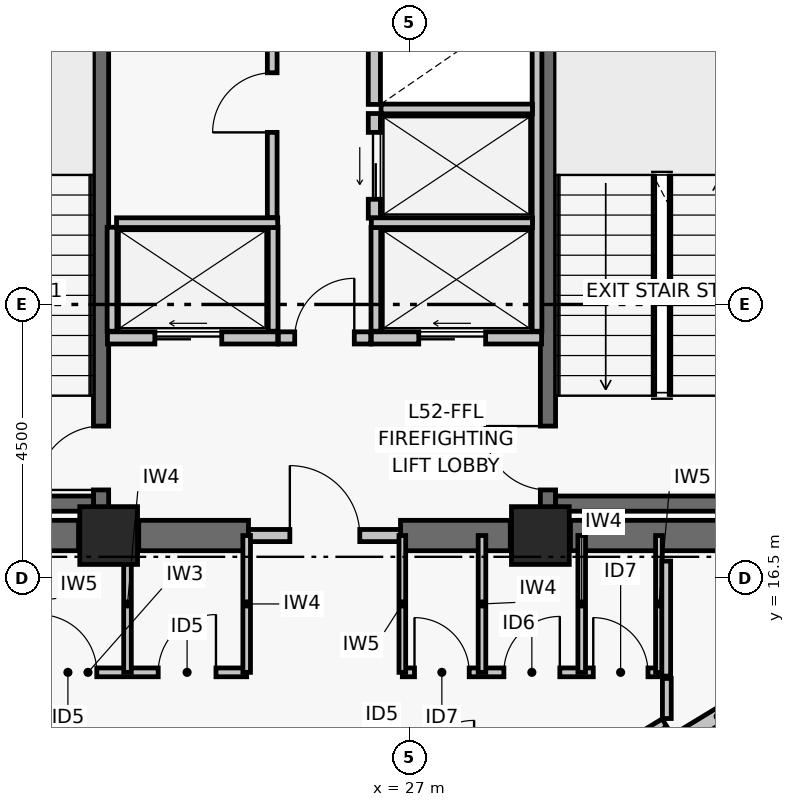
"""IFC4 building model, lengths in metres.
Left out: names, types, materials, properties, quantities, classifications, styles, units other than length and angle.
Written with IfcOpenShell. Run it as: python <this file> out.ifc"""

import sys

from ifc_helpers import new_model, si_unit, direction, frame, frame_2d, origin, origin_2d, place, context, subcontext, project, spatial, rectangle, extrude, element, fill, save


model = new_model("IFC4")
c1 = context("Model", 3, precision=1e-05, world=origin(), true_north=direction((0.0, 1.0)))
c2 = subcontext(c1, "Body", "Model", "MODEL_VIEW")
j1 = project(units=[si_unit("LENGTHUNIT", "METRE"), si_unit("PLANEANGLEUNIT", "RADIAN")], contexts=[c1])
p1 = place(None, origin())
s1 = spatial("IfcSite", under=j1, at=p1, CompositionType="ELEMENT")
p2 = place(p1, origin())
s2 = spatial("IfcBuilding", under=s1, at=p2, CompositionType="ELEMENT")
p3 = place(p2, frame((0.0, 0.0, 206.4)))
s3 = spatial("IfcBuildingStorey", under=s2, at=p3, CompositionType="ELEMENT", Elevation=206.4)
for number, where, z_axis, x_axis in (
    (1, (22.05, 17.2, 0.0), (0.0, 0.0, 1.0), (1.0, 0.0, 0.0)),
    (2, (29.15, 17.2, 0.0), (0.0, 0.0, 1.0), (1.0, 0.0, 0.0)),
):
    element("IfcColumn", number, at=place(p3, frame(where, z_axis=z_axis, x_axis=x_axis)), inside=s3, PredefinedType="COLUMN", context=c2, shape_type="SweptSolid", body=[
        extrude(rectangle(XDim=0.95, YDim=0.95, at=origin_2d()), origin(), (0.0, 0.0, 1.0), 3.72),
    ])
p4 = place(p3, frame((18.295, 17.2, 0.0), z_axis=(0.0, 0.0, 1.0), x_axis=(1.0, 0.0, 0.0)))
e3 = element("IfcWall", 3, at=p4, inside=s3, PredefinedType="SHEAR", context=c2, shape_type="SweptSolid", body=[
    extrude(rectangle(XDim=3.26, YDim=0.5, at=frame_2d((1.63, 0.0))), origin(), (0.0, 0.0, 1.0), 3.5),
])
p5 = place(p3, frame((22.545, 17.2, 0.0), z_axis=(0.0, 0.0, 1.0), x_axis=(1.0, 0.0, 0.0)))
e4 = element("IfcWall", 4, at=p5, inside=s3, PredefinedType="SHEAR", context=c2, shape_type="SweptSolid", body=[
    extrude(rectangle(XDim=1.805, YDim=0.5, at=frame_2d((0.903, 0.0))), origin(), (0.0, 0.0, 1.0), 3.5),
])
p6 = place(p3, frame((26.85, 17.2, 0.0), z_axis=(0.0, 0.0, 1.0), x_axis=(1.0, 0.0, 0.0)))
e5 = element("IfcWall", 5, at=p6, inside=s3, PredefinedType="SHEAR", context=c2, shape_type="SweptSolid", body=[
    extrude(rectangle(XDim=1.805, YDim=0.5, at=frame_2d((0.902, 0.0))), origin(), (0.0, 0.0, 1.0), 3.5),
])
p7 = place(p3, frame((29.645, 17.2, 0.0), z_axis=(0.0, 0.0, 1.0), x_axis=(1.0, 0.0, 0.0)))
e6 = element("IfcWall", 6, at=p7, inside=s3, PredefinedType="SHEAR", context=c2, shape_type="SweptSolid", body=[
    extrude(rectangle(XDim=3.26, YDim=0.5, at=frame_2d((1.63, 0.0))), origin(), (0.0, 0.0, 1.0), 3.5),
])
p8 = place(p3, frame((21.925, 17.6, 0.0), z_axis=(0.0, 0.0, 1.0), x_axis=(0.0, 1.0, 0.0)))
e7 = element("IfcWall", 7, at=p8, inside=s3, PredefinedType="SHEAR", context=c2, shape_type="SweptSolid", body=[
    extrude(rectangle(XDim=8.8, YDim=0.25, at=frame_2d((4.4, 0.0))), origin(), (0.0, 0.0, 1.0), 3.5),
])
p9 = place(p8, frame((0.35, 0.0, 0.0)))
e8 = element("IfcOpeningElement", 8, at=p9, cuts=e7, PredefinedType="OPENING", context=c2, shape_type="SweptSolid", body=[
    extrude(rectangle(XDim=1.05, YDim=2.08, at=frame_2d((0.525, 1.04))), frame((0.0, 0.135, 0.0), z_axis=(0.0, -1.0, 0.0), x_axis=(1.0, 0.0, 0.0)), (0.0, 0.0, 1.0), 0.27),
])
p10 = place(p3, frame((18.304, 17.725, 0.0), z_axis=(0.0, 0.0, 1.0), x_axis=(1.0, 0.0, 0.0)))
e9 = element("IfcWall", 9, at=p10, inside=s3, PredefinedType="SHEAR", context=c2, shape_type="SweptSolid", body=[
    extrude(rectangle(XDim=3.496, YDim=0.25, at=frame_2d((1.748, 0.0))), origin(), (0.0, 0.0, 1.0), 3.5),
])
p11 = place(p3, frame((29.275, 17.6, 0.0), z_axis=(0.0, 0.0, 1.0), x_axis=(0.0, 1.0, 0.0)))
e10 = element("IfcWall", 10, at=p11, inside=s3, PredefinedType="SHEAR", context=c2, shape_type="SweptSolid", body=[
    extrude(rectangle(XDim=8.8, YDim=0.25, at=frame_2d((4.4, 0.0))), origin(), (0.0, 0.0, 1.0), 3.5),
])
p12 = place(p11, frame((0.35, 0.0, 0.0)))
e11 = element("IfcOpeningElement", 11, at=p12, cuts=e10, PredefinedType="OPENING", context=c2, shape_type="SweptSolid", body=[
    extrude(rectangle(XDim=1.05, YDim=2.08, at=frame_2d((0.525, 1.04))), frame((0.0, 0.135, 0.0), z_axis=(0.0, -1.0, 0.0), x_axis=(1.0, 0.0, 0.0)), (0.0, 0.0, 1.0), 0.27),
])
p13 = place(p3, frame((29.4, 17.725, 0.0), z_axis=(0.0, 0.0, 1.0), x_axis=(1.0, 0.0, 0.0)))
e12 = element("IfcWall", 12, at=p13, inside=s3, PredefinedType="SHEAR", context=c2, shape_type="SweptSolid", body=[
    extrude(rectangle(XDim=3.496, YDim=0.25, at=frame_2d((1.748, 0.0))), origin(), (0.0, 0.0, 1.0), 3.5),
])
p14 = place(p3, frame((34.761, 15.858, 0.0), z_axis=(0.0, 0.0, 1.0), x_axis=(-0.854645314226, -0.519212275348, 0.0)))
e13 = element("IfcWall", 13, at=p14, inside=s3, PredefinedType="PARTITIONING", context=c2, shape_type="SweptSolid", body=[
    extrude(rectangle(XDim=6.285, YDim=0.26, at=frame_2d((3.143, 0.0))), origin(), (0.0, 0.0, 1.0), 3.5),
])
p15 = place(p3, frame((24.35, 17.2, 0.0), z_axis=(0.0, 0.0, 1.0), x_axis=(1.0, 0.0, 0.0)))
e14 = element("IfcWall", 14, at=p15, inside=s3, PredefinedType="PARTITIONING", context=c2, shape_type="SweptSolid", body=[
    extrude(rectangle(XDim=2.5, YDim=0.2, at=frame_2d((1.25, 0.0))), origin(), (0.0, 0.0, 1.0), 2.63),
])
p16 = place(p15, frame((0.68, 0.0, 0.0)))
e15 = element("IfcOpeningElement", 15, at=p16, cuts=e14, PredefinedType="OPENING", context=c2, shape_type="SweptSolid", body=[
    extrude(rectangle(XDim=1.15, YDim=2.08, at=frame_2d((0.575, 1.04))), frame((0.0, 0.11, 0.0), z_axis=(0.0, -1.0, 0.0), x_axis=(1.0, 0.0, 0.0)), (0.0, 0.0, 1.0), 0.22),
])
p17 = place(p3, frame((24.84, 20.45, 0.0), z_axis=(0.0, 0.0, 1.0), x_axis=(1.0, 0.0, 0.0)))
e16 = element("IfcWall", 16, at=p17, inside=s3, PredefinedType="PARTITIONING", context=c2, shape_type="SweptSolid", body=[
    extrude(rectangle(XDim=1.52, YDim=0.2, at=frame_2d((0.76, 0.0))), origin(), (0.0, 0.0, 1.0), 3.5),
])
p18 = place(p17, frame((0.27, 0.0, 0.0)))
e17 = element("IfcOpeningElement", 17, at=p18, cuts=e16, PredefinedType="OPENING", context=c2, shape_type="SweptSolid", body=[
    extrude(rectangle(XDim=0.98, YDim=2.06, at=frame_2d((0.49, 1.03))), frame((0.0, 0.11, 0.0), z_axis=(0.0, -1.0, 0.0), x_axis=(1.0, 0.0, 0.0)), (0.0, 0.0, 1.0), 0.22),
])
p19 = place(p3, frame((22.03, 20.45, 0.0), z_axis=(0.0, 0.0, 1.0), x_axis=(1.0, 0.0, 0.0)))
e18 = element("IfcWall", 18, at=p19, inside=s3, PredefinedType="PARTITIONING", context=c2, shape_type="SweptSolid", body=[
    extrude(rectangle(XDim=2.8, YDim=0.2, at=frame_2d((1.4, 0.0))), origin(), (0.0, 0.0, 1.0), 3.5),
])
p20 = place(p19, frame((0.78, 0.0, 0.0)))
e19 = element("IfcOpeningElement", 19, at=p20, cuts=e18, PredefinedType="OPENING", context=c2, shape_type="SweptSolid", body=[
    extrude(rectangle(XDim=1.1, YDim=2.08, at=frame_2d((0.55, 1.04))), frame((0.0, 0.11, 0.0), z_axis=(0.0, -1.0, 0.0), x_axis=(1.0, 0.0, 0.0)), (0.0, 0.0, 1.0), 0.22),
])
p21 = place(p3, frame((26.37, 20.45, 0.0), z_axis=(0.0, 0.0, 1.0), x_axis=(1.0, 0.0, 0.0)))
e20 = element("IfcWall", 20, at=p21, inside=s3, PredefinedType="PARTITIONING", context=c2, shape_type="SweptSolid", body=[
    extrude(rectangle(XDim=2.8, YDim=0.2, at=frame_2d((1.4, 0.0))), origin(), (0.0, 0.0, 1.0), 3.5),
])
p22 = place(p21, frame((0.78, 0.0, 0.0)))
e21 = element("IfcOpeningElement", 21, at=p22, cuts=e20, PredefinedType="OPENING", context=c2, shape_type="SweptSolid", body=[
    extrude(rectangle(XDim=1.1, YDim=2.08, at=frame_2d((0.55, 1.04))), frame((0.0, 0.11, 0.0), z_axis=(0.0, -1.0, 0.0), x_axis=(1.0, 0.0, 0.0)), (0.0, 0.0, 1.0), 0.22),
])
p23 = place(p3, frame((26.42, 22.42, 0.0), z_axis=(0.0, 0.0, 1.0), x_axis=(0.0, 1.0, 0.0)))
e22 = element("IfcWall", 22, at=p23, inside=s3, PredefinedType="PARTITIONING", context=c2, shape_type="SweptSolid", body=[
    extrude(rectangle(XDim=1.72, YDim=0.2, at=frame_2d((0.86, 0.0))), origin(), (0.0, 0.0, 1.0), 3.5),
])
p24 = place(p23, frame((0.31, 0.0, 0.0)))
e23 = element("IfcOpeningElement", 23, at=p24, cuts=e22, PredefinedType="OPENING", context=c2, shape_type="SweptSolid", body=[
    extrude(rectangle(XDim=1.1, YDim=2.08, at=frame_2d((0.55, 1.04))), frame((0.0, 0.11, 0.0), z_axis=(0.0, -1.0, 0.0), x_axis=(1.0, 0.0, 0.0)), (0.0, 0.0, 1.0), 0.22),
])
p25 = place(p3, frame((26.42, 24.29, 0.0), z_axis=(0.0, 0.0, 1.0), x_axis=(0.0, 1.0, 0.0)))
e24 = element("IfcWall", 24, at=p25, inside=s3, PredefinedType="PARTITIONING", context=c2, shape_type="SweptSolid", body=[
    extrude(rectangle(XDim=1.72, YDim=0.2, at=frame_2d((0.86, 0.0))), origin(), (0.0, 0.0, 1.0), 3.5),
])
for number, where, z_axis, x_axis in (
    (25, (22.105, 20.56, 0.0), (0.0, 0.0, 1.0), (0.0, 1.0, 0.0)),
    (26, (24.755, 20.56, 0.0), (0.0, 0.0, 1.0), (0.0, 1.0, 0.0)),
):
    element("IfcWall", number, at=place(p3, frame(where, z_axis=z_axis, x_axis=x_axis)), inside=s3, PredefinedType="PARTITIONING", context=c2, shape_type="SweptSolid", body=[
        extrude(rectangle(XDim=1.71, YDim=0.16, at=frame_2d((0.855, 0.0))), origin(), (0.0, 0.0, 1.0), 3.5),
    ])
p26 = place(p3, frame((22.18, 22.345, 0.0), z_axis=(0.0, 0.0, 1.0), x_axis=(1.0, 0.0, 0.0)))
e27 = element("IfcWall", 27, at=p26, inside=s3, PredefinedType="PARTITIONING", context=c2, shape_type="SweptSolid", body=[
    extrude(rectangle(XDim=2.65, YDim=0.16, at=frame_2d((1.325, 0.0))), origin(), (0.0, 0.0, 1.0), 3.5),
])
p27 = place(p3, frame((29.095, 20.56, 0.0), z_axis=(0.0, 0.0, 1.0), x_axis=(0.0, 1.0, 0.0)))
e28 = element("IfcWall", 28, at=p27, inside=s3, PredefinedType="PARTITIONING", context=c2, shape_type="SweptSolid", body=[
    extrude(rectangle(XDim=5.45, YDim=0.16, at=frame_2d((2.725, 0.0))), origin(), (0.0, 0.0, 1.0), 3.5),
])
p28 = place(p3, frame((26.445, 20.56, 0.0), z_axis=(0.0, 0.0, 1.0), x_axis=(0.0, 1.0, 0.0)))
e29 = element("IfcWall", 29, at=p28, inside=s3, PredefinedType="PARTITIONING", context=c2, shape_type="SweptSolid", body=[
    extrude(rectangle(XDim=1.71, YDim=0.16, at=frame_2d((0.855, 0.0))), origin(), (0.0, 0.0, 1.0), 3.5),
])
p29 = place(p3, frame((26.37, 22.345, 0.0), z_axis=(0.0, 0.0, 1.0), x_axis=(1.0, 0.0, 0.0)))
e30 = element("IfcWall", 30, at=p29, inside=s3, PredefinedType="PARTITIONING", context=c2, shape_type="SweptSolid", body=[
    extrude(rectangle(XDim=2.65, YDim=0.16, at=frame_2d((1.325, 0.0))), origin(), (0.0, 0.0, 1.0), 3.5),
])
p30 = place(p3, frame((26.53, 24.215, 0.0), z_axis=(0.0, 0.0, 1.0), x_axis=(1.0, 0.0, 0.0)))
e31 = element("IfcWall", 31, at=p30, inside=s3, PredefinedType="PARTITIONING", context=c2, shape_type="SweptSolid", body=[
    extrude(rectangle(XDim=2.49, YDim=0.16, at=frame_2d((1.245, 0.0))), origin(), (0.0, 0.0, 1.0), 3.5),
])
p31 = place(p3, frame((24.74, 22.43, 0.0), z_axis=(0.0, 0.0, 1.0), x_axis=(0.0, 1.0, 0.0)))
e32 = element("IfcWall", 32, at=p31, inside=s3, PredefinedType="PARTITIONING", context=c2, shape_type="SweptSolid", body=[
    extrude(rectangle(XDim=4.37, YDim=0.16, at=frame_2d((2.185, 0.0))), origin(), (0.0, 0.0, 1.0), 2.21),
])
p32 = place(p31, frame((1.4, 0.0, 0.0)))
e33 = element("IfcOpeningElement", 33, at=p32, cuts=e32, PredefinedType="OPENING", context=c2, shape_type="SweptSolid", body=[
    extrude(rectangle(XDim=0.98, YDim=2.06, at=frame_2d((0.49, 1.03))), frame((0.0, 0.09, 0.0), z_axis=(0.0, -1.0, 0.0), x_axis=(1.0, 0.0, 0.0)), (0.0, 0.0, 1.0), 0.18),
])
p33 = place(p3, frame((19.1, 14.95, 0.0), z_axis=(0.0, 0.0, 1.0), x_axis=(1.0, 0.0, 0.0)))
e34 = element("IfcWall", 34, at=p33, inside=s3, PredefinedType="PARTITIONING", context=c2, shape_type="SweptSolid", body=[
    extrude(rectangle(XDim=5.22, YDim=0.145, at=frame_2d((2.61, 0.0))), origin(), (0.0, 0.0, 1.0), 2.73),
])
p34 = place(p33, frame((0.2, 0.0, 0.0)))
e35 = element("IfcOpeningElement", 35, at=p34, cuts=e34, PredefinedType="OPENING", context=c2, shape_type="SweptSolid", body=[
    extrude(rectangle(XDim=0.9, YDim=2.02, at=frame_2d((0.45, 1.01))), frame((0.0, 0.083, 0.0), z_axis=(0.0, -1.0, 0.0), x_axis=(1.0, 0.0, 0.0)), (0.0, 0.0, 1.0), 0.165),
])
p35 = place(p33, frame((1.805, 0.0, 0.0)))
e36 = element("IfcOpeningElement", 36, at=p35, cuts=e34, PredefinedType="OPENING", context=c2, shape_type="SweptSolid", body=[
    extrude(rectangle(XDim=0.95, YDim=2.06, at=frame_2d((0.475, 1.03))), frame((0.0, 0.083, 0.0), z_axis=(0.0, -1.0, 0.0), x_axis=(1.0, 0.0, 0.0)), (0.0, 0.0, 1.0), 0.165),
])
p36 = place(p33, frame((3.765, 0.0, 0.0)))
e37 = element("IfcOpeningElement", 37, at=p36, cuts=e34, PredefinedType="OPENING", context=c2, shape_type="SweptSolid", body=[
    extrude(rectangle(XDim=0.95, YDim=2.06, at=frame_2d((0.475, 1.03))), frame((0.0, 0.083, 0.0), z_axis=(0.0, -1.0, 0.0), x_axis=(1.0, 0.0, 0.0)), (0.0, 0.0, 1.0), 0.165),
])
p37 = place(p3, frame((26.88, 14.95, 0.0), z_axis=(0.0, 0.0, 1.0), x_axis=(1.0, 0.0, 0.0)))
e38 = element("IfcWall", 38, at=p37, inside=s3, PredefinedType="PARTITIONING", context=c2, shape_type="SweptSolid", body=[
    extrude(rectangle(XDim=4.22, YDim=0.145, at=frame_2d((2.11, 0.0))), origin(), (0.0, 0.0, 1.0), 2.93),
])
p38 = place(p37, frame((0.2, 0.0, 0.0)))
e39 = element("IfcOpeningElement", 39, at=p38, cuts=e38, PredefinedType="OPENING", context=c2, shape_type="SweptSolid", body=[
    extrude(rectangle(XDim=0.9, YDim=2.02, at=frame_2d((0.45, 1.01))), frame((0.0, 0.083, 0.0), z_axis=(0.0, -1.0, 0.0), x_axis=(1.0, 0.0, 0.0)), (0.0, 0.0, 1.0), 0.165),
])
p39 = place(p37, frame((1.67, 0.0, 0.0)))
e40 = element("IfcOpeningElement", 40, at=p39, cuts=e38, PredefinedType="OPENING", context=c2, shape_type="SweptSolid", body=[
    extrude(rectangle(XDim=0.92, YDim=2.05, at=frame_2d((0.46, 1.025))), frame((0.0, 0.083, 0.0), z_axis=(0.0, -1.0, 0.0), x_axis=(1.0, 0.0, 0.0)), (0.0, 0.0, 1.0), 0.165),
])
p40 = place(p37, frame((3.14, 0.0, 0.0)))
e41 = element("IfcOpeningElement", 41, at=p40, cuts=e38, PredefinedType="OPENING", context=c2, shape_type="SweptSolid", body=[
    extrude(rectangle(XDim=0.9, YDim=2.02, at=frame_2d((0.45, 1.01))), frame((0.0, 0.083, 0.0), z_axis=(0.0, -1.0, 0.0), x_axis=(1.0, 0.0, 0.0)), (0.0, 0.0, 1.0), 0.165),
])
for number, where, z_axis, x_axis in (
    (42, (22.36, 14.95, 0.0), (0.0, 0.0, 1.0), (0.0, 1.0, 0.0)),
    (43, (24.32, 14.95, 0.0), (0.0, 0.0, 1.0), (0.0, 1.0, 0.0)),
):
    element("IfcWall", number, at=place(p3, frame(where, z_axis=z_axis, x_axis=x_axis)), inside=s3, PredefinedType="PARTITIONING", context=c2, shape_type="SweptSolid", body=[
        extrude(rectangle(XDim=2.25, YDim=0.125, at=frame_2d((1.125, 0.0))), origin(), (0.0, 0.0, 1.0), 2.63),
    ])
p41 = place(p3, frame((26.88, 14.95, 0.0), z_axis=(0.0, 0.0, 1.0), x_axis=(0.0, 1.0, 0.0)))
e44 = element("IfcWall", 44, at=p41, inside=s3, PredefinedType="PARTITIONING", context=c2, shape_type="SweptSolid", body=[
    extrude(rectangle(XDim=2.25, YDim=0.11, at=frame_2d((1.125, 0.0))), origin(), (0.0, 0.0, 1.0), 2.63),
])
for number, where, z_axis, x_axis in (
    (45, (28.19, 14.95, 0.0), (0.0, 0.0, 1.0), (0.0, 1.0, 0.0)),
    (46, (29.83, 14.95, 0.0), (0.0, 0.0, 1.0), (0.0, 1.0, 0.0)),
):
    element("IfcWall", number, at=place(p3, frame(where, z_axis=z_axis, x_axis=x_axis)), inside=s3, PredefinedType="PARTITIONING", context=c2, shape_type="SweptSolid", body=[
        extrude(rectangle(XDim=2.25, YDim=0.125, at=frame_2d((1.125, 0.0))), origin(), (0.0, 0.0, 1.0), 2.63),
    ])
p42 = place(p3, frame((31.1, 14.95, 0.0), z_axis=(0.0, 0.0, 1.0), x_axis=(0.0, 1.0, 0.0)))
e47 = element("IfcWall", 47, at=p42, inside=s3, PredefinedType="PARTITIONING", context=c2, shape_type="SweptSolid", body=[
    extrude(rectangle(XDim=2.25, YDim=0.11, at=frame_2d((1.125, 0.0))), origin(), (0.0, 0.0, 1.0), 2.63),
])
p43 = place(p3, frame((29.709, 13.222, 0.0), z_axis=(0.0, 0.0, 1.0), x_axis=(0.854635840942, 0.519227868451, 0.0)))
e48 = element("IfcWall", 48, at=p43, inside=s3, PredefinedType="PARTITIONING", context=c2, shape_type="SweptSolid", body=[
    extrude(rectangle(XDim=1.735, YDim=0.145, at=frame_2d((0.867, 0.0))), origin(), (0.0, 0.0, 1.0), 3.5),
])
p44 = place(p3, frame((31.23, 14.191, 0.0), z_axis=(0.0, 0.0, 1.0), x_axis=(0.0, 1.0, 0.0)))
e49 = element("IfcWall", 49, at=p44, inside=s3, PredefinedType="PARTITIONING", context=c2, shape_type="SweptSolid", body=[
    extrude(rectangle(XDim=0.659, YDim=0.145, at=frame_2d((0.33, 0.0))), origin(), (0.0, 0.0, 1.0), 3.5),
])
p45 = place(p3, frame((31.22, 14.889, 0.0), z_axis=(0.0, 0.0, 1.0), x_axis=(0.0, 1.0, 0.0)))
e50 = element("IfcWall", 50, at=p45, inside=s3, PredefinedType="PARTITIONING", context=c2, shape_type="SweptSolid", body=[
    extrude(rectangle(XDim=1.891, YDim=0.145, at=frame_2d((0.946, 0.0))), origin(), (0.0, 0.0, 1.0), 2.63),
])
p46 = place(p9, origin())
e51 = element("IfcDoor", 51, at=p46, inside=s3, OperationType="SINGLE_SWING_LEFT", PredefinedType="DOOR", context=c2, shape_type="SweptSolid", body=[
    extrude(rectangle(XDim=1.05, YDim=2.08, at=frame_2d((0.525, 1.04))), frame((0.0, 0.025, 0.0), z_axis=(0.0, -1.0, 0.0), x_axis=(1.0, 0.0, 0.0)), (0.0, 0.0, 1.0), 0.05),
])
fill(e8, e51)
p47 = place(p12, origin())
e52 = element("IfcDoor", 52, at=p47, inside=s3, OperationType="SINGLE_SWING_RIGHT", PredefinedType="DOOR", context=c2, shape_type="SweptSolid", body=[
    extrude(rectangle(XDim=1.05, YDim=2.08, at=frame_2d((0.525, 1.04))), frame((0.0, 0.025, 0.0), z_axis=(0.0, -1.0, 0.0), x_axis=(1.0, 0.0, 0.0)), (0.0, 0.0, 1.0), 0.05),
])
fill(e11, e52)
p48 = place(p16, origin())
e53 = element("IfcDoor", 53, at=p48, inside=s3, OperationType="SINGLE_SWING_LEFT", PredefinedType="DOOR", context=c2, shape_type="SweptSolid", body=[
    extrude(rectangle(XDim=1.15, YDim=2.08, at=frame_2d((0.575, 1.04))), frame((0.0, 0.025, 0.0), z_axis=(0.0, -1.0, 0.0), x_axis=(1.0, 0.0, 0.0)), (0.0, 0.0, 1.0), 0.05),
])
fill(e15, e53)
p49 = place(p18, origin())
e54 = element("IfcDoor", 54, at=p49, inside=s3, OperationType="SINGLE_SWING_RIGHT", PredefinedType="DOOR", context=c2, shape_type="SweptSolid", body=[
    extrude(rectangle(XDim=0.98, YDim=2.06, at=frame_2d((0.49, 1.03))), frame((0.0, 0.025, 0.0), z_axis=(0.0, -1.0, 0.0), x_axis=(1.0, 0.0, 0.0)), (0.0, 0.0, 1.0), 0.05),
])
fill(e17, e54)
p50 = place(p20, origin())
e55 = element("IfcDoor", 55, at=p50, inside=s3, OperationType="DOUBLE_DOOR_SLIDING", PredefinedType="DOOR", context=c2, shape_type="SweptSolid", body=[
    extrude(rectangle(XDim=1.1, YDim=2.08, at=frame_2d((0.55, 1.04))), frame((0.0, 0.025, 0.0), z_axis=(0.0, -1.0, 0.0), x_axis=(1.0, 0.0, 0.0)), (0.0, 0.0, 1.0), 0.05),
])
fill(e19, e55)
p51 = place(p22, origin())
e56 = element("IfcDoor", 56, at=p51, inside=s3, OperationType="DOUBLE_DOOR_SLIDING", PredefinedType="DOOR", context=c2, shape_type="SweptSolid", body=[
    extrude(rectangle(XDim=1.1, YDim=2.08, at=frame_2d((0.55, 1.04))), frame((0.0, 0.025, 0.0), z_axis=(0.0, -1.0, 0.0), x_axis=(1.0, 0.0, 0.0)), (0.0, 0.0, 1.0), 0.05),
])
fill(e21, e56)
p52 = place(p24, origin())
e57 = element("IfcDoor", 57, at=p52, inside=s3, OperationType="DOUBLE_DOOR_SLIDING", PredefinedType="DOOR", context=c2, shape_type="SweptSolid", body=[
    extrude(rectangle(XDim=1.1, YDim=2.08, at=frame_2d((0.55, 1.04))), frame((0.0, 0.025, 0.0), z_axis=(0.0, -1.0, 0.0), x_axis=(1.0, 0.0, 0.0)), (0.0, 0.0, 1.0), 0.05),
])
fill(e23, e57)
p53 = place(p32, origin())
e58 = element("IfcDoor", 58, at=p53, inside=s3, OperationType="SINGLE_SWING_LEFT", PredefinedType="DOOR", context=c2, shape_type="SweptSolid", body=[
    extrude(rectangle(XDim=0.98, YDim=2.06, at=frame_2d((0.49, 1.03))), frame((0.0, 0.025, 0.0), z_axis=(0.0, -1.0, 0.0), x_axis=(1.0, 0.0, 0.0)), (0.0, 0.0, 1.0), 0.05),
])
fill(e33, e58)
p54 = place(p35, origin())
e59 = element("IfcDoor", 59, at=p54, inside=s3, OperationType="SINGLE_SWING_LEFT", PredefinedType="DOOR", context=c2, shape_type="SweptSolid", body=[
    extrude(rectangle(XDim=0.95, YDim=2.06, at=frame_2d((0.475, 1.03))), frame((0.0, 0.025, 0.0), z_axis=(0.0, -1.0, 0.0), x_axis=(1.0, 0.0, 0.0)), (0.0, 0.0, 1.0), 0.05),
])
fill(e36, e59)
p55 = place(p36, origin())
e60 = element("IfcDoor", 60, at=p55, inside=s3, OperationType="SINGLE_SWING_RIGHT", PredefinedType="DOOR", context=c2, shape_type="SweptSolid", body=[
    extrude(rectangle(XDim=0.95, YDim=2.06, at=frame_2d((0.475, 1.03))), frame((0.0, 0.025, 0.0), z_axis=(0.0, -1.0, 0.0), x_axis=(1.0, 0.0, 0.0)), (0.0, 0.0, 1.0), 0.05),
])
fill(e37, e60)
p56 = place(p38, origin())
e61 = element("IfcDoor", 61, at=p56, inside=s3, OperationType="SINGLE_SWING_LEFT", PredefinedType="DOOR", context=c2, shape_type="SweptSolid", body=[
    extrude(rectangle(XDim=0.9, YDim=2.02, at=frame_2d((0.45, 1.01))), frame((0.0, 0.025, 0.0), z_axis=(0.0, -1.0, 0.0), x_axis=(1.0, 0.0, 0.0)), (0.0, 0.0, 1.0), 0.05),
])
fill(e39, e61)
p57 = place(p39, origin())
e62 = element("IfcDoor", 62, at=p57, inside=s3, OperationType="SINGLE_SWING_RIGHT", PredefinedType="DOOR", context=c2, shape_type="SweptSolid", body=[
    extrude(rectangle(XDim=0.92, YDim=2.05, at=frame_2d((0.46, 1.025))), frame((0.0, 0.025, 0.0), z_axis=(0.0, -1.0, 0.0), x_axis=(1.0, 0.0, 0.0)), (0.0, 0.0, 1.0), 0.05),
])
fill(e40, e62)
p58 = place(p40, origin())
e63 = element("IfcDoor", 63, at=p58, inside=s3, OperationType="SINGLE_SWING_LEFT", PredefinedType="DOOR", context=c2, shape_type="SweptSolid", body=[
    extrude(rectangle(XDim=0.9, YDim=2.02, at=frame_2d((0.45, 1.01))), frame((0.0, 0.025, 0.0), z_axis=(0.0, -1.0, 0.0), x_axis=(1.0, 0.0, 0.0)), (0.0, 0.0, 1.0), 0.05),
])
fill(e41, e63)
save(model, sys.argv[1])
